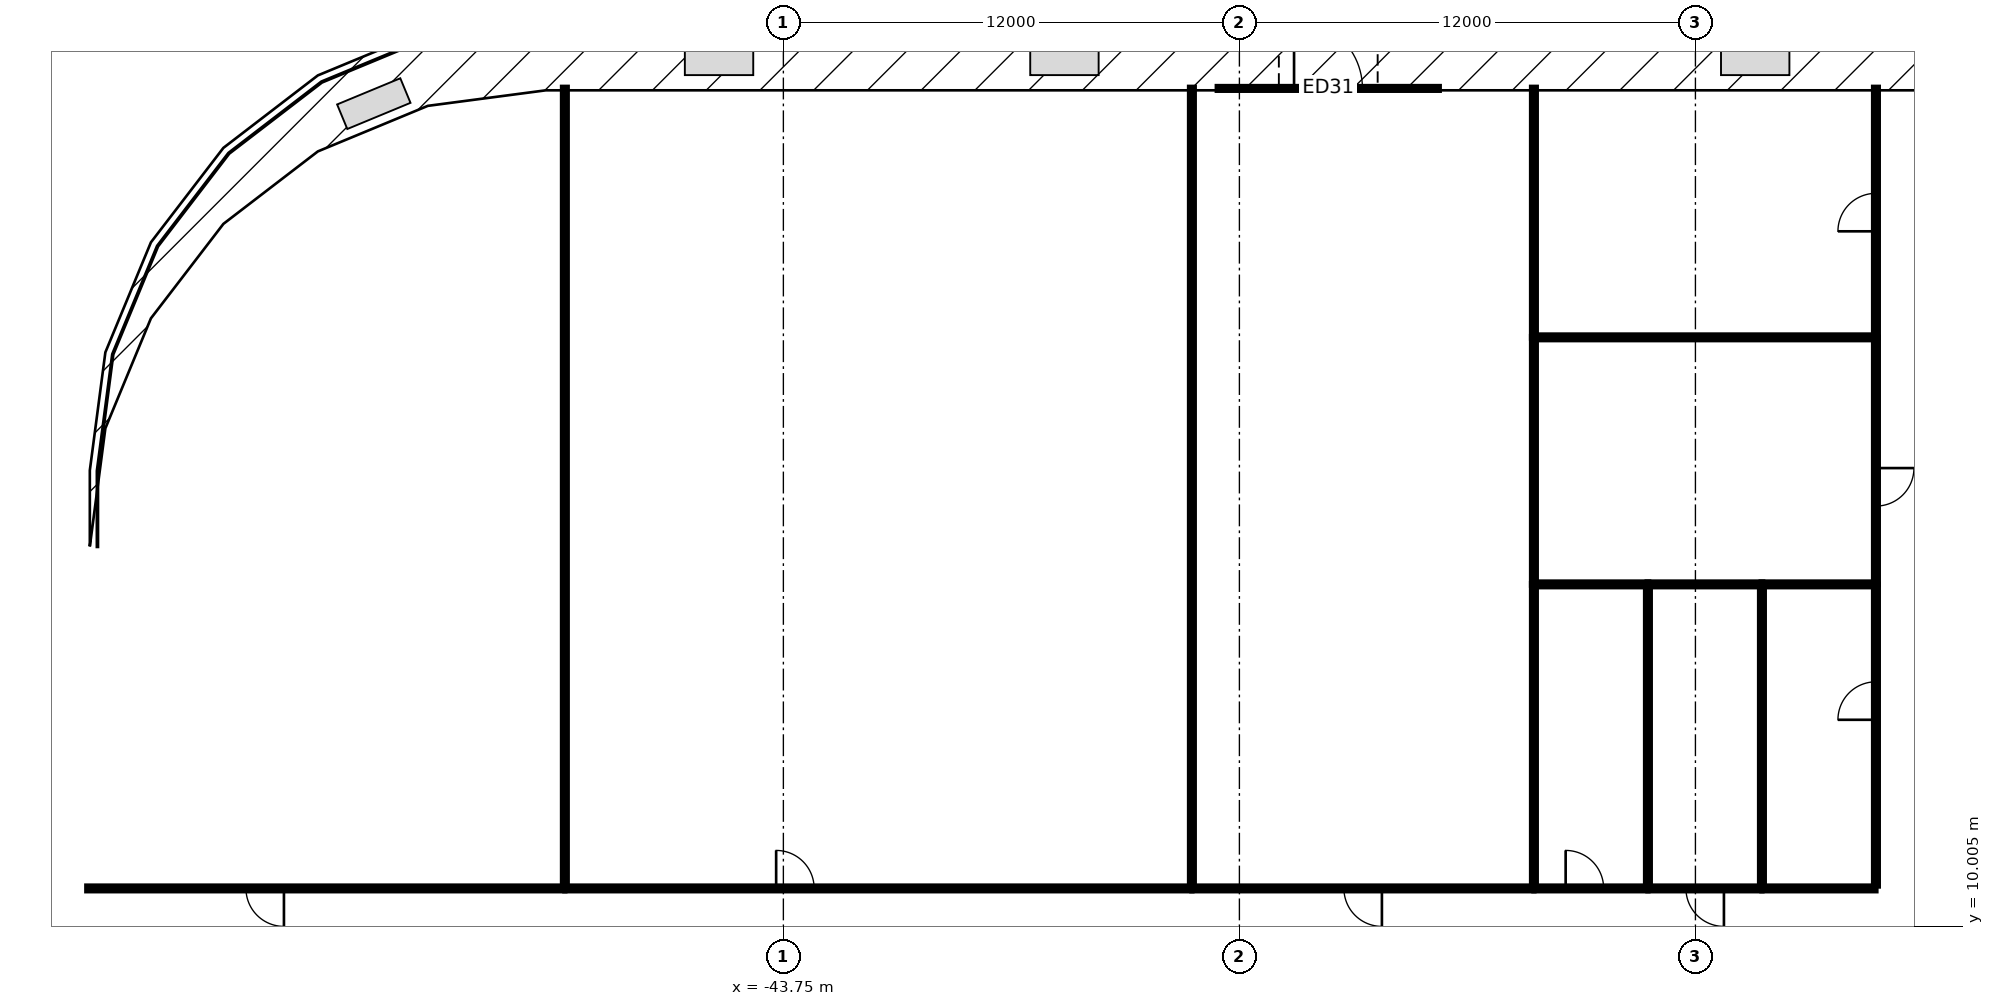
"""IFC4 building model, lengths in metres.
Left out: names, types, materials, properties, quantities, classifications, styles, units other than length and angle.
Written with IfcOpenShell. Run it as: python <this file> out.ifc"""

import sys

from ifc_helpers import new_model, si_unit, direction, frame, frame_2d, origin, origin_2d, place, context, subcontext, project, spatial, rectangle, hollow_rectangle, circle, extrude, element, fill, save


model = new_model("IFC4")
c1 = context("Model", 3, precision=1e-05, world=origin(), true_north=direction((0.0, 1.0)))
c2 = subcontext(c1, "Body", "Model", "MODEL_VIEW")
j1 = project(units=[si_unit("LENGTHUNIT", "METRE"), si_unit("PLANEANGLEUNIT", "RADIAN")], contexts=[c1])
p1 = place(None, origin())
s1 = spatial("IfcSite", under=j1, at=p1, CompositionType="ELEMENT")
p2 = place(p1, origin())
s2 = spatial("IfcBuilding", under=s1, at=p2, CompositionType="ELEMENT")
p3 = place(p2, frame((0.0, 0.0, 12.0)))
s3 = spatial("IfcBuildingStorey", under=s2, at=p3, CompositionType="ELEMENT", Elevation=12.0)
p4 = place(p3, frame((-59.4, 21.0, 0.0), z_axis=(0.0, 0.0, 1.0), x_axis=(1.0, 0.0, 0.0)))
e1 = element("IfcColumn", 1, at=p4, inside=s3, PredefinedType="COLUMN", context=c2, shape_type="SweptSolid", body=[
    extrude(circle(Radius=0.6, at=origin_2d()), origin(), (0.0, 0.0, 1.0), 4.2),
])
for number, where, z_axis, x_axis in (
    (2, (-54.6, 12.6, 0.0), (0.0, 0.0, 1.0), (1.0, 0.0, 0.0)),
    (3, (-54.6, 21.0, 0.0), (0.0, 0.0, 1.0), (1.0, 0.0, 0.0)),
):
    element("IfcColumn", number, at=place(p3, frame(where, z_axis=z_axis, x_axis=x_axis)), inside=s3, PredefinedType="COLUMN", context=c2, shape_type="SweptSolid", body=[
        extrude(circle(Radius=0.6, at=origin_2d()), origin(), (0.0, 0.0, 1.0), 4.5),
    ])
p5 = place(p3, frame((-54.6, 27.4, 0.0), z_axis=(0.0, 0.0, 1.0), x_axis=(1.0, 0.0, 0.0)))
e4 = element("IfcColumn", 4, at=p5, inside=s3, PredefinedType="COLUMN", context=c2, shape_type="SweptSolid", body=[
    extrude(circle(Radius=0.6, at=origin_2d()), origin(), (0.0, 0.0, 1.0), 4.2),
])
for number, where, z_axis, x_axis in (
    (5, (-37.8, 27.4, 0.0), (0.0, 0.0, 1.0), (1.0, 0.0, 0.0)),
    (6, (-21.0, 27.4, 0.0), (0.0, 0.0, 1.0), (1.0, 0.0, 0.0)),
):
    element("IfcColumn", number, at=place(p3, frame(where, z_axis=z_axis, x_axis=x_axis)), inside=s3, PredefinedType="COLUMN", context=c2, shape_type="SweptSolid", body=[
        extrude(circle(Radius=0.6, at=origin_2d()), origin(), (0.0, 0.0, 1.0), 4.5),
    ])
for number, where, z_axis, x_axis in (
    (7, (-20.539, 19.418, 0.0), (0.0, 0.0, 1.0), (0.5, 0.866, 0.0)),
    (8, (-31.75, 21.904, 0.0), (0.0, 0.0, 1.0), (0.0, 1.0, 0.0)),
    (9, (-42.961, 19.418, 0.0), (0.0, 0.0, 1.0), (-0.5, 0.866, 0.0)),
):
    element("IfcColumn", number, at=place(p3, frame(where, z_axis=z_axis, x_axis=x_axis)), inside=s3, PredefinedType="COLUMN", context=c2, shape_type="SweptSolid", body=[
        extrude(hollow_rectangle(XDim=1.5, YDim=1.5, WallThickness=0.07, at=origin_2d()), origin(), (0.0, 0.0, 1.0), 4.5),
    ])
p6 = place(p3, frame((-32.333, 32.05, 0.0), z_axis=(0.0, 0.0, 1.0), x_axis=(1.0, 0.0, 0.0)))
e10 = element("IfcWall", 10, at=p6, inside=s3, PredefinedType="STANDARD", context=c2, shape_type="SweptSolid", body=[
    extrude(rectangle(XDim=5.843, YDim=0.1, at=frame_2d((2.921, 0.0))), origin(), (0.0, 0.0, 1.0), 4.5),
])
p7 = place(p6, frame((2.021, 0.0, 0.0)))
e11 = element("IfcOpeningElement", 11, at=p7, cuts=e10, PredefinedType="OPENING", context=c2, shape_type="SweptSolid", body=[
    extrude(rectangle(XDim=1.8, YDim=2.4, at=frame_2d((0.9, 1.2))), frame((0.0, 0.06, 0.0), z_axis=(0.0, -1.0, 0.0), x_axis=(1.0, 0.0, 0.0)), (0.0, 0.0, 1.0), 0.12),
])
p8 = place(p3, frame((-21.0, 11.0, 0.0), z_axis=(0.0, 0.0, 1.0), x_axis=(-1.0, 0.0, 0.0)))
e12 = element("IfcWall", 12, at=p8, inside=s3, PredefinedType="PARTITIONING", context=c2, shape_type="SweptSolid", body=[
    extrude(rectangle(XDim=3.0, YDim=0.125, at=frame_2d((1.5, 0.0))), origin(), (0.0, 0.0, 1.0), 4.2),
])
p9 = place(p8, frame((1.165, 0.0, 0.0)))
e13 = element("IfcOpeningElement", 13, at=p9, cuts=e12, PredefinedType="OPENING", context=c2, shape_type="SweptSolid", body=[
    extrude(rectangle(XDim=1.0, YDim=2.1, at=frame_2d((0.5, 1.05))), frame((0.0, 0.073, 0.0), z_axis=(0.0, -1.0, 0.0), x_axis=(1.0, 0.0, 0.0)), (0.0, 0.0, 1.0), 0.145),
])
p10 = place(p3, frame((-18.0, 11.0, 0.0), z_axis=(0.0, 0.0, 1.0), x_axis=(-1.0, 0.0, 0.0)))
e14 = element("IfcWall", 14, at=p10, inside=s3, PredefinedType="PARTITIONING", context=c2, shape_type="SweptSolid", body=[
    extrude(rectangle(XDim=3.0, YDim=0.125, at=frame_2d((1.5, 0.0))), origin(), (0.0, 0.0, 1.0), 3.647),
])
p11 = place(p10, frame((1.0, 0.0, 0.0)))
e15 = element("IfcOpeningElement", 15, at=p11, cuts=e14, PredefinedType="OPENING", context=c2, shape_type="SweptSolid", body=[
    extrude(rectangle(XDim=1.0, YDim=2.1, at=frame_2d((0.5, 1.05))), frame((0.0, 0.073, 0.0), z_axis=(0.0, -1.0, 0.0), x_axis=(1.0, 0.0, 0.0)), (0.0, 0.0, 1.0), 0.145),
])
p12 = place(p3, frame((-15.0, 11.0, 0.0), z_axis=(0.0, 0.0, 1.0), x_axis=(-1.0, 0.0, 0.0)))
e16 = element("IfcWall", 16, at=p12, inside=s3, PredefinedType="PARTITIONING", context=c2, shape_type="SweptSolid", body=[
    extrude(rectangle(XDim=3.0, YDim=0.125, at=frame_2d((1.5, 0.0))), origin(), (0.0, 0.0, 1.0), 4.2),
])
p13 = place(p3, frame((-49.5, 11.0, 0.0), z_axis=(0.0, 0.0, 1.0), x_axis=(-1.0, 0.0, 0.0)))
e17 = element("IfcWall", 17, at=p13, inside=s3, PredefinedType="PARTITIONING", context=c2, shape_type="SweptSolid", body=[
    extrude(rectangle(XDim=12.58, YDim=0.125, at=frame_2d((6.29, 0.0))), origin(), (0.0, 0.0, 1.0), 2.68),
])
p14 = place(p13, frame((7.392, 0.0, 0.0)))
e18 = element("IfcOpeningElement", 18, at=p14, cuts=e17, PredefinedType="OPENING", context=c2, shape_type="SweptSolid", body=[
    extrude(rectangle(XDim=1.0, YDim=2.1, at=frame_2d((0.5, 1.05))), frame((0.0, 0.073, 0.0), z_axis=(0.0, -1.0, 0.0), x_axis=(1.0, 0.0, 0.0)), (0.0, 0.0, 1.0), 0.145),
])
p15 = place(p3, frame((-33.0, 11.0, 0.0), z_axis=(0.0, 0.0, 1.0), x_axis=(-1.0, 0.0, 0.0)))
e19 = element("IfcWall", 19, at=p15, inside=s3, PredefinedType="PARTITIONING", context=c2, shape_type="SweptSolid", body=[
    extrude(rectangle(XDim=16.5, YDim=0.125, at=frame_2d((8.25, 0.0))), origin(), (0.0, 0.0, 1.0), 3.496),
])
p16 = place(p15, frame((9.94, 0.0, 0.0)))
e20 = element("IfcOpeningElement", 20, at=p16, cuts=e19, PredefinedType="OPENING", context=c2, shape_type="SweptSolid", body=[
    extrude(rectangle(XDim=1.0, YDim=2.1, at=frame_2d((0.5, 1.05))), frame((0.0, 0.073, 0.0), z_axis=(0.0, -1.0, 0.0), x_axis=(1.0, 0.0, 0.0)), (0.0, 0.0, 1.0), 0.145),
])
p17 = place(p3, frame((-24.0, 11.0, 0.0), z_axis=(0.0, 0.0, 1.0), x_axis=(-1.0, 0.0, 0.0)))
e21 = element("IfcWall", 21, at=p17, inside=s3, PredefinedType="PARTITIONING", context=c2, shape_type="SweptSolid", body=[
    extrude(rectangle(XDim=9.0, YDim=0.125, at=frame_2d((4.5, 0.0))), origin(), (0.0, 0.0, 1.0), 3.496),
])
p18 = place(p17, frame((4.0, 0.0, 0.0)))
e22 = element("IfcOpeningElement", 22, at=p18, cuts=e21, PredefinedType="OPENING", context=c2, shape_type="SweptSolid", body=[
    extrude(rectangle(XDim=1.0, YDim=2.1, at=frame_2d((0.5, 1.05))), frame((0.0, 0.073, 0.0), z_axis=(0.0, -1.0, 0.0), x_axis=(1.0, 0.0, 0.0)), (0.0, 0.0, 1.0), 0.145),
])
p19 = place(p3, frame((-15.0, 19.0, 0.0), z_axis=(0.0, 0.0, 1.0), x_axis=(0.0, -1.0, 0.0)))
e23 = element("IfcWall", 23, at=p19, inside=s3, PredefinedType="PARTITIONING", context=c2, shape_type="SweptSolid", body=[
    extrude(rectangle(XDim=7.938, YDim=0.125, at=frame_2d((3.969, 0.0))), origin(), (0.0, 0.0, 1.0), 3.496),
])
p20 = place(p19, frame((2.563, 0.0, 0.0)))
e24 = element("IfcOpeningElement", 24, at=p20, cuts=e23, PredefinedType="OPENING", context=c2, shape_type="SweptSolid", body=[
    extrude(rectangle(XDim=1.0, YDim=2.1, at=frame_2d((0.5, 1.05))), frame((0.0, 0.073, 0.0), z_axis=(0.0, -1.0, 0.0), x_axis=(1.0, 0.0, 0.0)), (0.0, 0.0, 1.0), 0.145),
])
p21 = place(p3, frame((-15.0, 25.5, 0.0), z_axis=(0.0, 0.0, 1.0), x_axis=(0.0, -1.0, 0.0)))
e25 = element("IfcWall", 25, at=p21, inside=s3, PredefinedType="PARTITIONING", context=c2, shape_type="SweptSolid", body=[
    extrude(rectangle(XDim=6.5, YDim=0.125, at=frame_2d((3.25, 0.0))), origin(), (0.0, 0.0, 1.0), 4.2),
])
p22 = place(p21, frame((3.44, 0.0, 0.0)))
e26 = element("IfcOpeningElement", 26, at=p22, cuts=e25, PredefinedType="OPENING", context=c2, shape_type="SweptSolid", body=[
    extrude(rectangle(XDim=1.0, YDim=2.1, at=frame_2d((0.5, 1.05))), frame((0.0, 0.073, 0.0), z_axis=(0.0, -1.0, 0.0), x_axis=(1.0, 0.0, 0.0)), (0.0, 0.0, 1.0), 0.145),
])
p23 = place(p3, frame((-15.0, 32.08, 0.0), z_axis=(0.0, 0.0, 1.0), x_axis=(0.0, -1.0, 0.0)))
e27 = element("IfcWall", 27, at=p23, inside=s3, PredefinedType="PARTITIONING", context=c2, shape_type="SweptSolid", body=[
    extrude(rectangle(XDim=6.58, YDim=0.125, at=frame_2d((3.29, 0.0))), origin(), (0.0, 0.0, 1.0), 2.68),
])
p24 = place(p23, frame((2.79, 0.0, 0.0)))
e28 = element("IfcOpeningElement", 28, at=p24, cuts=e27, PredefinedType="OPENING", context=c2, shape_type="SweptSolid", body=[
    extrude(rectangle(XDim=1.0, YDim=2.1, at=frame_2d((0.5, 1.05))), frame((0.0, 0.073, 0.0), z_axis=(0.0, -1.0, 0.0), x_axis=(1.0, 0.0, 0.0)), (0.0, 0.0, 1.0), 0.145),
])
p25 = place(p3, frame((-21.0, 11.062, 0.0), z_axis=(0.0, 0.0, 1.0), x_axis=(0.0, 1.0, 0.0)))
e29 = element("IfcWall", 29, at=p25, inside=s3, PredefinedType="PARTITIONING", context=c2, shape_type="SweptSolid", body=[
    extrude(rectangle(XDim=7.938, YDim=0.125, at=frame_2d((3.969, 0.0))), origin(), (0.0, 0.0, 1.0), 3.496),
])
p26 = place(p3, frame((-20.98, 19.0, 0.0), z_axis=(0.0, 0.0, 1.0), x_axis=(-1.0, 0.0, 0.0)))
e30 = element("IfcWall", 30, at=p26, inside=s3, PredefinedType="PARTITIONING", context=c2, shape_type="SweptSolid", body=[
    extrude(rectangle(XDim=2.958, YDim=0.125, at=frame_2d((1.479, 0.0))), origin(), (0.0, 0.0, 1.0), 4.2),
])
p27 = place(p3, frame((-24.0, 19.02, 0.0), z_axis=(0.0, 0.0, 1.0), x_axis=(0.0, -1.0, 0.0)))
e31 = element("IfcWall", 31, at=p27, inside=s3, PredefinedType="PARTITIONING", context=c2, shape_type="SweptSolid", body=[
    extrude(rectangle(XDim=7.958, YDim=0.125, at=frame_2d((3.979, 0.0))), origin(), (0.0, 0.0, 1.0), 3.496),
])
p28 = place(p3, frame((-18.0, 11.062, 0.0), z_axis=(0.0, 0.0, 1.0), x_axis=(0.0, 1.0, 0.0)))
e32 = element("IfcWall", 32, at=p28, inside=s3, PredefinedType="PARTITIONING", context=c2, shape_type="SweptSolid", body=[
    extrude(rectangle(XDim=7.938, YDim=0.125, at=frame_2d((3.969, 0.0))), origin(), (0.0, 0.0, 1.0), 3.496),
])
p29 = place(p3, frame((-17.98, 19.0, 0.0), z_axis=(0.0, 0.0, 1.0), x_axis=(-1.0, 0.0, 0.0)))
e33 = element("IfcWall", 33, at=p29, inside=s3, PredefinedType="PARTITIONING", context=c2, shape_type="SweptSolid", body=[
    extrude(rectangle(XDim=3.04, YDim=0.125, at=frame_2d((1.52, 0.0))), origin(), (0.0, 0.0, 1.0), 4.2),
])
p30 = place(p3, frame((-15.062, 19.0, 0.0), z_axis=(0.0, 0.0, 1.0), x_axis=(-1.0, 0.0, 0.0)))
e34 = element("IfcWall", 34, at=p30, inside=s3, PredefinedType="PARTITIONING", context=c2, shape_type="SweptSolid", body=[
    extrude(rectangle(XDim=2.958, YDim=0.125, at=frame_2d((1.479, 0.0))), origin(), (0.0, 0.0, 1.0), 4.2),
])
p31 = place(p3, frame((-15.062, 25.5, 0.0), z_axis=(0.0, 0.0, 1.0), x_axis=(-1.0, 0.0, 0.0)))
e35 = element("IfcWall", 35, at=p31, inside=s3, PredefinedType="PARTITIONING", context=c2, shape_type="SweptSolid", body=[
    extrude(rectangle(XDim=8.875, YDim=0.125, at=frame_2d((4.438, 0.0))), origin(), (0.0, 0.0, 1.0), 2.68),
])
p32 = place(p3, frame((-24.0, 25.52, 0.0), z_axis=(0.0, 0.0, 1.0), x_axis=(0.0, -1.0, 0.0)))
e36 = element("IfcWall", 36, at=p32, inside=s3, PredefinedType="PARTITIONING", context=c2, shape_type="SweptSolid", body=[
    extrude(rectangle(XDim=6.54, YDim=0.125, at=frame_2d((3.27, 0.0))), origin(), (0.0, 0.0, 1.0), 4.2),
])
p33 = place(p3, frame((-24.0, 32.08, 0.0), z_axis=(0.0, 0.0, 1.0), x_axis=(0.0, -1.0, 0.0)))
e37 = element("IfcWall", 37, at=p33, inside=s3, PredefinedType="PARTITIONING", context=c2, shape_type="SweptSolid", body=[
    extrude(rectangle(XDim=6.6, YDim=0.125, at=frame_2d((3.3, 0.0))), origin(), (0.0, 0.0, 1.0), 2.68),
])
for number, where, z_axis, x_axis in (
    (38, (-49.5, 11.062, 0.0), (0.0, 0.0, 1.0), (0.0, 1.0, 0.0)),
    (39, (-33.0, 11.062, 0.0), (0.0, 0.0, 1.0), (0.0, 1.0, 0.0)),
):
    element("IfcWall", number, at=place(p3, frame(where, z_axis=z_axis, x_axis=x_axis)), inside=s3, PredefinedType="PARTITIONING", context=c2, shape_type="SweptSolid", body=[
        extrude(rectangle(XDim=21.018, YDim=0.125, at=frame_2d((10.509, 0.0))), origin(), (0.0, 0.0, 1.0), 2.68),
    ])
p34 = place(p7, origin())
e40 = element("IfcDoor", 40, at=p34, inside=s3, OperationType="SINGLE_SWING_LEFT", PredefinedType="DOOR", context=c2, shape_type="SweptSolid", body=[
    extrude(rectangle(XDim=1.8, YDim=2.4, at=frame_2d((0.9, 1.2))), frame((0.0, 0.025, 0.0), z_axis=(0.0, -1.0, 0.0), x_axis=(1.0, 0.0, 0.0)), (0.0, 0.0, 1.0), 0.05),
])
fill(e11, e40)
p35 = place(p9, origin())
e41 = element("IfcDoor", 41, at=p35, inside=s3, OperationType="SINGLE_SWING_RIGHT", PredefinedType="DOOR", context=c2, shape_type="SweptSolid", body=[
    extrude(rectangle(XDim=1.0, YDim=2.1, at=frame_2d((0.5, 1.05))), frame((0.0, 0.025, 0.0), z_axis=(0.0, -1.0, 0.0), x_axis=(1.0, 0.0, 0.0)), (0.0, 0.0, 1.0), 0.05),
])
fill(e13, e41)
p36 = place(p11, origin())
e42 = element("IfcDoor", 42, at=p36, inside=s3, OperationType="SINGLE_SWING_LEFT", PredefinedType="DOOR", context=c2, shape_type="SweptSolid", body=[
    extrude(rectangle(XDim=1.0, YDim=2.1, at=frame_2d((0.5, 1.05))), frame((0.0, 0.025, 0.0), z_axis=(0.0, -1.0, 0.0), x_axis=(1.0, 0.0, 0.0)), (0.0, 0.0, 1.0), 0.05),
])
fill(e15, e42)
p37 = place(p20, origin())
e43 = element("IfcDoor", 43, at=p37, inside=s3, OperationType="SINGLE_SWING_RIGHT", PredefinedType="DOOR", context=c2, shape_type="SweptSolid", body=[
    extrude(rectangle(XDim=1.0, YDim=2.1, at=frame_2d((0.5, 1.05))), frame((0.0, 0.025, 0.0), z_axis=(0.0, -1.0, 0.0), x_axis=(1.0, 0.0, 0.0)), (0.0, 0.0, 1.0), 0.05),
])
fill(e24, e43)
p38 = place(p22, origin())
e44 = element("IfcDoor", 44, at=p38, inside=s3, OperationType="SINGLE_SWING_LEFT", PredefinedType="DOOR", context=c2, shape_type="SweptSolid", body=[
    extrude(rectangle(XDim=1.0, YDim=2.1, at=frame_2d((0.5, 1.05))), frame((0.0, 0.025, 0.0), z_axis=(0.0, -1.0, 0.0), x_axis=(1.0, 0.0, 0.0)), (0.0, 0.0, 1.0), 0.05),
])
fill(e26, e44)
p39 = place(p24, origin())
e45 = element("IfcDoor", 45, at=p39, inside=s3, OperationType="SINGLE_SWING_RIGHT", PredefinedType="DOOR", context=c2, shape_type="SweptSolid", body=[
    extrude(rectangle(XDim=1.0, YDim=2.1, at=frame_2d((0.5, 1.05))), frame((0.0, 0.025, 0.0), z_axis=(0.0, -1.0, 0.0), x_axis=(1.0, 0.0, 0.0)), (0.0, 0.0, 1.0), 0.05),
])
fill(e28, e45)
p40 = place(p14, origin())
e46 = element("IfcDoor", 46, at=p40, inside=s3, OperationType="SINGLE_SWING_LEFT", PredefinedType="DOOR", context=c2, shape_type="SweptSolid", body=[
    extrude(rectangle(XDim=1.0, YDim=2.1, at=frame_2d((0.5, 1.05))), frame((0.0, 0.025, 0.0), z_axis=(0.0, -1.0, 0.0), x_axis=(1.0, 0.0, 0.0)), (0.0, 0.0, 1.0), 0.05),
])
fill(e18, e46)
p41 = place(p16, origin())
e47 = element("IfcDoor", 47, at=p41, inside=s3, OperationType="SINGLE_SWING_RIGHT", PredefinedType="DOOR", context=c2, shape_type="SweptSolid", body=[
    extrude(rectangle(XDim=1.0, YDim=2.1, at=frame_2d((0.5, 1.05))), frame((0.0, 0.025, 0.0), z_axis=(0.0, -1.0, 0.0), x_axis=(1.0, 0.0, 0.0)), (0.0, 0.0, 1.0), 0.05),
])
fill(e20, e47)
p42 = place(p18, origin())
e48 = element("IfcDoor", 48, at=p42, inside=s3, OperationType="SINGLE_SWING_LEFT", PredefinedType="DOOR", context=c2, shape_type="SweptSolid", body=[
    extrude(rectangle(XDim=1.0, YDim=2.1, at=frame_2d((0.5, 1.05))), frame((0.0, 0.025, 0.0), z_axis=(0.0, -1.0, 0.0), x_axis=(1.0, 0.0, 0.0)), (0.0, 0.0, 1.0), 0.05),
])
fill(e22, e48)
save(model, sys.argv[1])
